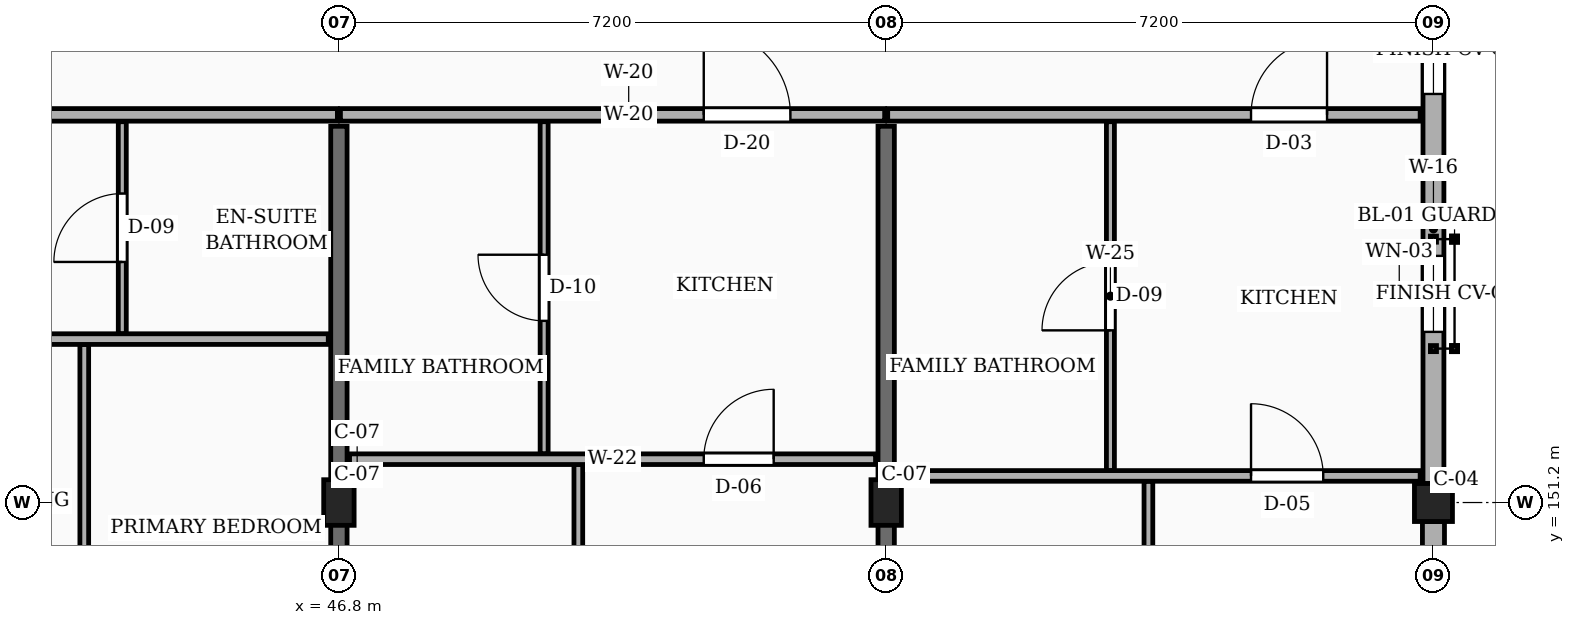
"""IFC4 building model, lengths in metres.
Left out: names, types, materials, properties, quantities, classifications, styles, units other than length and angle.
Written with IfcOpenShell. Run it as: python <this file> out.ifc"""

import sys

from ifc_helpers import new_model, si_unit, direction, frame, frame_2d, origin, origin_2d, place, context, subcontext, project, spatial, rectangle, extrude, element, fill, save


model = new_model("IFC4")
c1 = context("Model", 3, precision=1e-05, world=origin(), true_north=direction((0.0, 1.0)))
c2 = subcontext(c1, "Body", "Model", "MODEL_VIEW")
j1 = project(units=[si_unit("LENGTHUNIT", "METRE"), si_unit("PLANEANGLEUNIT", "RADIAN")], contexts=[c1])
p1 = place(None, origin())
s1 = spatial("IfcSite", under=j1, at=p1, CompositionType="ELEMENT")
p2 = place(p1, origin())
s2 = spatial("IfcBuilding", under=s1, at=p2, CompositionType="ELEMENT")
p3 = place(p2, frame((0.0, 0.0, 32.85)))
s3 = spatial("IfcBuildingStorey", under=s2, at=p3, CompositionType="ELEMENT", Elevation=32.85)
for number, where, z_axis, x_axis in (
    (1, (46.8, 151.2, 0.0), (0.0, 0.0, 1.0), (1.0, 0.0, 0.0)),
    (2, (54.0, 151.2, 0.0), (0.0, 0.0, 1.0), (1.0, 0.0, 0.0)),
):
    element("IfcColumn", number, at=place(p3, frame(where, z_axis=z_axis, x_axis=x_axis)), inside=s3, PredefinedType="COLUMN", context=c2, shape_type="SweptSolid", body=[
        extrude(rectangle(XDim=0.4, YDim=0.6, at=origin_2d()), origin(), (0.0, 0.0, 1.0), 3.15),
    ])
p4 = place(p3, frame((61.2, 151.2, 0.0), z_axis=(0.0, 0.0, 1.0), x_axis=(1.0, 0.0, 0.0)))
e3 = element("IfcColumn", 3, at=p4, inside=s3, PredefinedType="COLUMN", context=c2, shape_type="SweptSolid", body=[
    extrude(rectangle(XDim=0.5, YDim=0.5, at=origin_2d()), origin(), (0.0, 0.0, 1.0), 3.15),
])
for number, where, z_axis, x_axis in (
    (4, (46.8, 144.25, 0.0), (0.0, 0.0, 1.0), (0.0, 1.0, 0.0)),
    (5, (54.0, 144.25, 0.0), (0.0, 0.0, 1.0), (0.0, 1.0, 0.0)),
):
    element("IfcWall", number, at=place(p3, frame(where, z_axis=z_axis, x_axis=x_axis)), inside=s3, PredefinedType="SOLIDWALL", context=c2, shape_type="SweptSolid", body=[
        extrude(rectangle(XDim=11.9, YDim=0.215, at=frame_2d((5.95, 0.0))), origin(), (0.0, 0.0, 1.0), 2.185),
    ])
p5 = place(p3, frame((61.2, 144.25, 0.0), z_axis=(0.0, 0.0, 1.0), x_axis=(0.0, 1.0, 0.0)))
e6 = element("IfcWall", 6, at=p5, inside=s3, PredefinedType="SOLIDWALL", context=c2, shape_type="SweptSolid", body=[
    extrude(rectangle(XDim=6.7, YDim=0.29, at=frame_2d((3.35, 0.0))), origin(), (0.0, 0.0, 1.0), 2.455),
])
p6 = place(p5, frame((0.45, 0.0, 0.78)))
e7 = element("IfcOpeningElement", 7, at=p6, cuts=e6, PredefinedType="OPENING", context=c2, shape_type="SweptSolid", body=[
    extrude(rectangle(XDim=0.85, YDim=1.15, at=frame_2d((0.425, 0.575))), frame((0.0, 0.155, 0.0), z_axis=(0.0, -1.0, 0.0), x_axis=(1.0, 0.0, 0.0)), (0.0, 0.0, 1.0), 0.31),
])
p7 = place(p5, frame((4.65, 0.0, 0.78)))
e8 = element("IfcOpeningElement", 8, at=p7, cuts=e6, PredefinedType="OPENING", context=c2, shape_type="SweptSolid", body=[
    extrude(rectangle(XDim=1.0, YDim=1.15, at=frame_2d((0.5, 0.575))), frame((0.0, 0.155, 0.0), z_axis=(0.0, -1.0, 0.0), x_axis=(1.0, 0.0, 0.0)), (0.0, 0.0, 1.0), 0.31),
])
p8 = place(p3, frame((61.2, 151.45, 0.0), z_axis=(0.0, 0.0, 1.0), x_axis=(0.0, 1.0, 0.0)))
e9 = element("IfcWall", 9, at=p8, inside=s3, PredefinedType="SOLIDWALL", context=c2, shape_type="SweptSolid", body=[
    extrude(rectangle(XDim=6.7, YDim=0.275, at=frame_2d((3.35, 0.0))), origin(), (0.0, 0.0, 1.0), 2.455),
])
p9 = place(p8, frame((1.995, 0.0, 0.78)))
e10 = element("IfcOpeningElement", 10, at=p9, cuts=e9, PredefinedType="OPENING", context=c2, shape_type="SweptSolid", body=[
    extrude(rectangle(XDim=1.0, YDim=1.15, at=frame_2d((0.5, 0.575))), frame((0.0, 0.147, 0.0), z_axis=(0.0, -1.0, 0.0), x_axis=(1.0, 0.0, 0.0)), (0.0, 0.0, 1.0), 0.295),
])
p10 = place(p8, frame((5.125, 0.0, 0.78)))
e11 = element("IfcOpeningElement", 11, at=p10, cuts=e9, PredefinedType="OPENING", context=c2, shape_type="SweptSolid", body=[
    extrude(rectangle(XDim=1.16, YDim=1.15, at=frame_2d((0.58, 0.575))), frame((0.0, 0.147, 0.0), z_axis=(0.0, -1.0, 0.0), x_axis=(1.0, 0.0, 0.0)), (0.0, 0.0, 1.0), 0.295),
])
p11 = place(p3, frame((39.62, 156.3, 0.0), z_axis=(0.0, 0.0, 1.0), x_axis=(1.0, 0.0, 0.0)))
e12 = element("IfcWall", 12, at=p11, inside=s3, PredefinedType="PARTITIONING", context=c2, shape_type="SweptSolid", body=[
    extrude(rectangle(XDim=7.16, YDim=0.165, at=frame_2d((3.58, 0.0))), origin(), (0.0, 0.0, 1.0), 2.32),
])
p12 = place(p11, frame((1.33, 0.0, 0.0)))
e13 = element("IfcOpeningElement", 13, at=p12, cuts=e12, PredefinedType="OPENING", context=c2, shape_type="SweptSolid", body=[
    extrude(rectangle(XDim=0.94, YDim=2.12, at=frame_2d((0.47, 1.06))), frame((0.0, 0.093, 0.0), z_axis=(0.0, -1.0, 0.0), x_axis=(1.0, 0.0, 0.0)), (0.0, 0.0, 1.0), 0.185),
])
p13 = place(p3, frame((46.82, 156.3, 0.0), z_axis=(0.0, 0.0, 1.0), x_axis=(1.0, 0.0, 0.0)))
e14 = element("IfcWall", 14, at=p13, inside=s3, PredefinedType="PARTITIONING", context=c2, shape_type="SweptSolid", body=[
    extrude(rectangle(XDim=7.16, YDim=0.165, at=frame_2d((3.58, 0.0))), origin(), (0.0, 0.0, 1.0), 2.32),
])
p14 = place(p13, frame((4.78, 0.0, 0.0)))
e15 = element("IfcOpeningElement", 15, at=p14, cuts=e14, PredefinedType="OPENING", context=c2, shape_type="SweptSolid", body=[
    extrude(rectangle(XDim=1.14, YDim=2.18, at=frame_2d((0.57, 1.09))), frame((0.0, 0.093, 0.0), z_axis=(0.0, -1.0, 0.0), x_axis=(1.0, 0.0, 0.0)), (0.0, 0.0, 1.0), 0.185),
])
p15 = place(p3, frame((54.02, 156.3, 0.0), z_axis=(0.0, 0.0, 1.0), x_axis=(1.0, 0.0, 0.0)))
e16 = element("IfcWall", 16, at=p15, inside=s3, PredefinedType="PARTITIONING", context=c2, shape_type="SweptSolid", body=[
    extrude(rectangle(XDim=7.005, YDim=0.165, at=frame_2d((3.502, 0.0))), origin(), (0.0, 0.0, 1.0), 2.32),
])
p16 = place(p15, frame((4.78, 0.0, 0.0)))
e17 = element("IfcOpeningElement", 17, at=p16, cuts=e16, PredefinedType="OPENING", context=c2, shape_type="SweptSolid", body=[
    extrude(rectangle(XDim=1.0, YDim=2.15, at=frame_2d((0.5, 1.075))), frame((0.0, 0.093, 0.0), z_axis=(0.0, -1.0, 0.0), x_axis=(1.0, 0.0, 0.0)), (0.0, 0.0, 1.0), 0.185),
])
p17 = place(p3, frame((43.45, 144.175, 0.0), z_axis=(0.0, 0.0, 1.0), x_axis=(0.0, 1.0, 0.0)))
e18 = element("IfcWall", 18, at=p17, inside=s3, PredefinedType="PARTITIONING", context=c2, shape_type="SweptSolid", body=[
    extrude(rectangle(XDim=9.105, YDim=0.115, at=frame_2d((4.552, 0.0))), origin(), (0.0, 0.0, 1.0), 2.32),
])
p18 = place(p17, frame((4.103, 0.0, 0.0)))
e19 = element("IfcOpeningElement", 19, at=p18, cuts=e18, PredefinedType="OPENING", context=c2, shape_type="SweptSolid", body=[
    extrude(rectangle(XDim=0.9, YDim=2.1, at=frame_2d((0.45, 1.05))), frame((0.0, 0.067, 0.0), z_axis=(0.0, -1.0, 0.0), x_axis=(1.0, 0.0, 0.0)), (0.0, 0.0, 1.0), 0.135),
])
p19 = place(p3, frame((43.95, 153.42, 0.0), z_axis=(0.0, 0.0, 1.0), x_axis=(0.0, 1.0, 0.0)))
e20 = element("IfcWall", 20, at=p19, inside=s3, PredefinedType="PARTITIONING", context=c2, shape_type="SweptSolid", body=[
    extrude(rectangle(XDim=2.79, YDim=0.105, at=frame_2d((1.395, 0.0))), origin(), (0.0, 0.0, 1.0), 2.32),
])
p20 = place(p19, frame((0.945, 0.0, 0.0)))
e21 = element("IfcOpeningElement", 21, at=p20, cuts=e20, PredefinedType="OPENING", context=c2, shape_type="SweptSolid", body=[
    extrude(rectangle(XDim=0.9, YDim=2.05, at=frame_2d((0.45, 1.025))), frame((0.0, 0.062, 0.0), z_axis=(0.0, -1.0, 0.0), x_axis=(1.0, 0.0, 0.0)), (0.0, 0.0, 1.0), 0.125),
])
p21 = place(p3, frame((39.74, 153.35, 0.0), z_axis=(0.0, 0.0, 1.0), x_axis=(1.0, 0.0, 0.0)))
e22 = element("IfcWall", 22, at=p21, inside=s3, PredefinedType="PARTITIONING", context=c2, shape_type="SweptSolid", body=[
    extrude(rectangle(XDim=6.92, YDim=0.14, at=frame_2d((3.46, 0.0))), origin(), (0.0, 0.0, 1.0), 2.32),
])
p22 = place(p21, frame((1.31, 0.0, 0.0)))
e23 = element("IfcOpeningElement", 23, at=p22, cuts=e22, PredefinedType="OPENING", context=c2, shape_type="SweptSolid", body=[
    extrude(rectangle(XDim=0.95, YDim=2.1, at=frame_2d((0.475, 1.05))), frame((0.0, 0.08, 0.0), z_axis=(0.0, -1.0, 0.0), x_axis=(1.0, 0.0, 0.0)), (0.0, 0.0, 1.0), 0.16),
])
p23 = place(p3, frame((49.95, 144.175, 0.0), z_axis=(0.0, 0.0, 1.0), x_axis=(0.0, 1.0, 0.0)))
e24 = element("IfcWall", 24, at=p23, inside=s3, PredefinedType="PARTITIONING", context=c2, shape_type="SweptSolid", body=[
    extrude(rectangle(XDim=7.525, YDim=0.115, at=frame_2d((3.762, 0.0))), origin(), (0.0, 0.0, 1.0), 2.32),
])
p24 = place(p23, frame((3.323, 0.0, 0.0)))
e25 = element("IfcOpeningElement", 25, at=p24, cuts=e24, PredefinedType="OPENING", context=c2, shape_type="SweptSolid", body=[
    extrude(rectangle(XDim=0.88, YDim=2.08, at=frame_2d((0.44, 1.04))), frame((0.0, 0.067, 0.0), z_axis=(0.0, -1.0, 0.0), x_axis=(1.0, 0.0, 0.0)), (0.0, 0.0, 1.0), 0.135),
])
p25 = place(p3, frame((49.5, 151.84, 0.0), z_axis=(0.0, 0.0, 1.0), x_axis=(0.0, 1.0, 0.0)))
e26 = element("IfcWall", 26, at=p25, inside=s3, PredefinedType="PARTITIONING", context=c2, shape_type="SweptSolid", body=[
    extrude(rectangle(XDim=4.37, YDim=0.105, at=frame_2d((2.185, 0.0))), origin(), (0.0, 0.0, 1.0), 2.32),
])
p26 = place(p25, frame((1.75, 0.0, 0.0)))
e27 = element("IfcOpeningElement", 27, at=p26, cuts=e26, PredefinedType="OPENING", context=c2, shape_type="SweptSolid", body=[
    extrude(rectangle(XDim=0.87, YDim=2.05, at=frame_2d((0.435, 1.025))), frame((0.0, 0.062, 0.0), z_axis=(0.0, -1.0, 0.0), x_axis=(1.0, 0.0, 0.0)), (0.0, 0.0, 1.0), 0.125),
])
p27 = place(p3, frame((46.94, 151.77, 0.0), z_axis=(0.0, 0.0, 1.0), x_axis=(1.0, 0.0, 0.0)))
e28 = element("IfcWall", 28, at=p27, inside=s3, PredefinedType="PARTITIONING", context=c2, shape_type="SweptSolid", body=[
    extrude(rectangle(XDim=6.92, YDim=0.14, at=frame_2d((3.46, 0.0))), origin(), (0.0, 0.0, 1.0), 2.32),
])
p28 = place(p27, frame((4.66, 0.0, 0.0)))
e29 = element("IfcOpeningElement", 29, at=p28, cuts=e28, PredefinedType="OPENING", context=c2, shape_type="SweptSolid", body=[
    extrude(rectangle(XDim=0.92, YDim=2.1, at=frame_2d((0.46, 1.05))), frame((0.0, 0.08, 0.0), z_axis=(0.0, -1.0, 0.0), x_axis=(1.0, 0.0, 0.0)), (0.0, 0.0, 1.0), 0.16),
])
p29 = place(p3, frame((57.45, 144.175, 0.0), z_axis=(0.0, 0.0, 1.0), x_axis=(0.0, 1.0, 0.0)))
e30 = element("IfcWall", 30, at=p29, inside=s3, PredefinedType="PARTITIONING", context=c2, shape_type="SweptSolid", body=[
    extrude(rectangle(XDim=7.305, YDim=0.115, at=frame_2d((3.652, 0.0))), origin(), (0.0, 0.0, 1.0), 2.32),
])
p30 = place(p29, frame((3.202, 0.0, 0.0)))
e31 = element("IfcOpeningElement", 31, at=p30, cuts=e30, PredefinedType="OPENING", context=c2, shape_type="SweptSolid", body=[
    extrude(rectangle(XDim=0.9, YDim=2.1, at=frame_2d((0.45, 1.05))), frame((0.0, 0.067, 0.0), z_axis=(0.0, -1.0, 0.0), x_axis=(1.0, 0.0, 0.0)), (0.0, 0.0, 1.0), 0.135),
])
p31 = place(p3, frame((56.95, 151.62, 0.0), z_axis=(0.0, 0.0, 1.0), x_axis=(0.0, 1.0, 0.0)))
e32 = element("IfcWall", 32, at=p31, inside=s3, PredefinedType="PARTITIONING", context=c2, shape_type="SweptSolid", body=[
    extrude(rectangle(XDim=4.59, YDim=0.105, at=frame_2d((2.295, 0.0))), origin(), (0.0, 0.0, 1.0), 2.32),
])
p32 = place(p31, frame((1.845, 0.0, 0.0)))
e33 = element("IfcOpeningElement", 33, at=p32, cuts=e32, PredefinedType="OPENING", context=c2, shape_type="SweptSolid", body=[
    extrude(rectangle(XDim=0.9, YDim=2.05, at=frame_2d((0.45, 1.025))), frame((0.0, 0.062, 0.0), z_axis=(0.0, -1.0, 0.0), x_axis=(1.0, 0.0, 0.0)), (0.0, 0.0, 1.0), 0.125),
])
p33 = place(p3, frame((54.14, 151.55, 0.0), z_axis=(0.0, 0.0, 1.0), x_axis=(1.0, 0.0, 0.0)))
e34 = element("IfcWall", 34, at=p33, inside=s3, PredefinedType="PARTITIONING", context=c2, shape_type="SweptSolid", body=[
    extrude(rectangle(XDim=6.885, YDim=0.14, at=frame_2d((3.442, 0.0))), origin(), (0.0, 0.0, 1.0), 2.32),
])
p34 = place(p33, frame((4.66, 0.0, 0.0)))
e35 = element("IfcOpeningElement", 35, at=p34, cuts=e34, PredefinedType="OPENING", context=c2, shape_type="SweptSolid", body=[
    extrude(rectangle(XDim=0.95, YDim=2.1, at=frame_2d((0.475, 1.05))), frame((0.0, 0.08, 0.0), z_axis=(0.0, -1.0, 0.0), x_axis=(1.0, 0.0, 0.0)), (0.0, 0.0, 1.0), 0.16),
])
p35 = place(p9, origin())
e36 = element("IfcWindow", 36, at=p35, inside=s3, PartitioningType="SINGLE_PANEL", PredefinedType="WINDOW", context=c2, shape_type="SweptSolid", body=[
    extrude(rectangle(XDim=1.0, YDim=1.15, at=frame_2d((0.5, 0.575))), frame((0.0, 0.03, 0.0), z_axis=(0.0, -1.0, 0.0), x_axis=(1.0, 0.0, 0.0)), (0.0, 0.0, 1.0), 0.06),
])
fill(e10, e36)
p36 = place(p10, origin())
e37 = element("IfcWindow", 37, at=p36, inside=s3, PartitioningType="SINGLE_PANEL", PredefinedType="WINDOW", context=c2, shape_type="SweptSolid", body=[
    extrude(rectangle(XDim=1.16, YDim=1.15, at=frame_2d((0.58, 0.575))), frame((0.0, 0.03, 0.0), z_axis=(0.0, -1.0, 0.0), x_axis=(1.0, 0.0, 0.0)), (0.0, 0.0, 1.0), 0.06),
])
fill(e11, e37)
p37 = place(p14, origin())
e38 = element("IfcDoor", 38, at=p37, inside=s3, OperationType="SINGLE_SWING_LEFT", PredefinedType="DOOR", context=c2, shape_type="SweptSolid", body=[
    extrude(rectangle(XDim=1.14, YDim=2.18, at=frame_2d((0.57, 1.09))), frame((0.0, 0.025, 0.0), z_axis=(0.0, -1.0, 0.0), x_axis=(1.0, 0.0, 0.0)), (0.0, 0.0, 1.0), 0.05),
])
fill(e15, e38)
p38 = place(p16, origin())
e39 = element("IfcDoor", 39, at=p38, inside=s3, OperationType="SINGLE_SWING_RIGHT", PredefinedType="DOOR", context=c2, shape_type="SweptSolid", body=[
    extrude(rectangle(XDim=1.0, YDim=2.15, at=frame_2d((0.5, 1.075))), frame((0.0, 0.025, 0.0), z_axis=(0.0, -1.0, 0.0), x_axis=(1.0, 0.0, 0.0)), (0.0, 0.0, 1.0), 0.05),
])
fill(e17, e39)
p39 = place(p20, origin())
e40 = element("IfcDoor", 40, at=p39, inside=s3, OperationType="SINGLE_SWING_LEFT", PredefinedType="DOOR", context=c2, shape_type="SweptSolid", body=[
    extrude(rectangle(XDim=0.9, YDim=2.05, at=frame_2d((0.45, 1.025))), frame((0.0, 0.025, 0.0), z_axis=(0.0, -1.0, 0.0), x_axis=(1.0, 0.0, 0.0)), (0.0, 0.0, 1.0), 0.05),
])
fill(e21, e40)
p40 = place(p26, origin())
e41 = element("IfcDoor", 41, at=p40, inside=s3, OperationType="SINGLE_SWING_RIGHT", PredefinedType="DOOR", context=c2, shape_type="SweptSolid", body=[
    extrude(rectangle(XDim=0.87, YDim=2.05, at=frame_2d((0.435, 1.025))), frame((0.0, 0.025, 0.0), z_axis=(0.0, -1.0, 0.0), x_axis=(1.0, 0.0, 0.0)), (0.0, 0.0, 1.0), 0.05),
])
fill(e27, e41)
p41 = place(p28, origin())
e42 = element("IfcDoor", 42, at=p41, inside=s3, OperationType="SINGLE_SWING_RIGHT", PredefinedType="DOOR", context=c2, shape_type="SweptSolid", body=[
    extrude(rectangle(XDim=0.92, YDim=2.1, at=frame_2d((0.46, 1.05))), frame((0.0, 0.025, 0.0), z_axis=(0.0, -1.0, 0.0), x_axis=(1.0, 0.0, 0.0)), (0.0, 0.0, 1.0), 0.05),
])
fill(e29, e42)
p42 = place(p32, origin())
e43 = element("IfcDoor", 43, at=p42, inside=s3, OperationType="SINGLE_SWING_LEFT", PredefinedType="DOOR", context=c2, shape_type="SweptSolid", body=[
    extrude(rectangle(XDim=0.9, YDim=2.05, at=frame_2d((0.45, 1.025))), frame((0.0, 0.025, 0.0), z_axis=(0.0, -1.0, 0.0), x_axis=(1.0, 0.0, 0.0)), (0.0, 0.0, 1.0), 0.05),
])
fill(e33, e43)
p43 = place(p34, origin())
e44 = element("IfcDoor", 44, at=p43, inside=s3, OperationType="SINGLE_SWING_LEFT", PredefinedType="DOOR", context=c2, shape_type="SweptSolid", body=[
    extrude(rectangle(XDim=0.95, YDim=2.1, at=frame_2d((0.475, 1.05))), frame((0.0, 0.025, 0.0), z_axis=(0.0, -1.0, 0.0), x_axis=(1.0, 0.0, 0.0)), (0.0, 0.0, 1.0), 0.05),
])
fill(e35, e44)
save(model, sys.argv[1])
